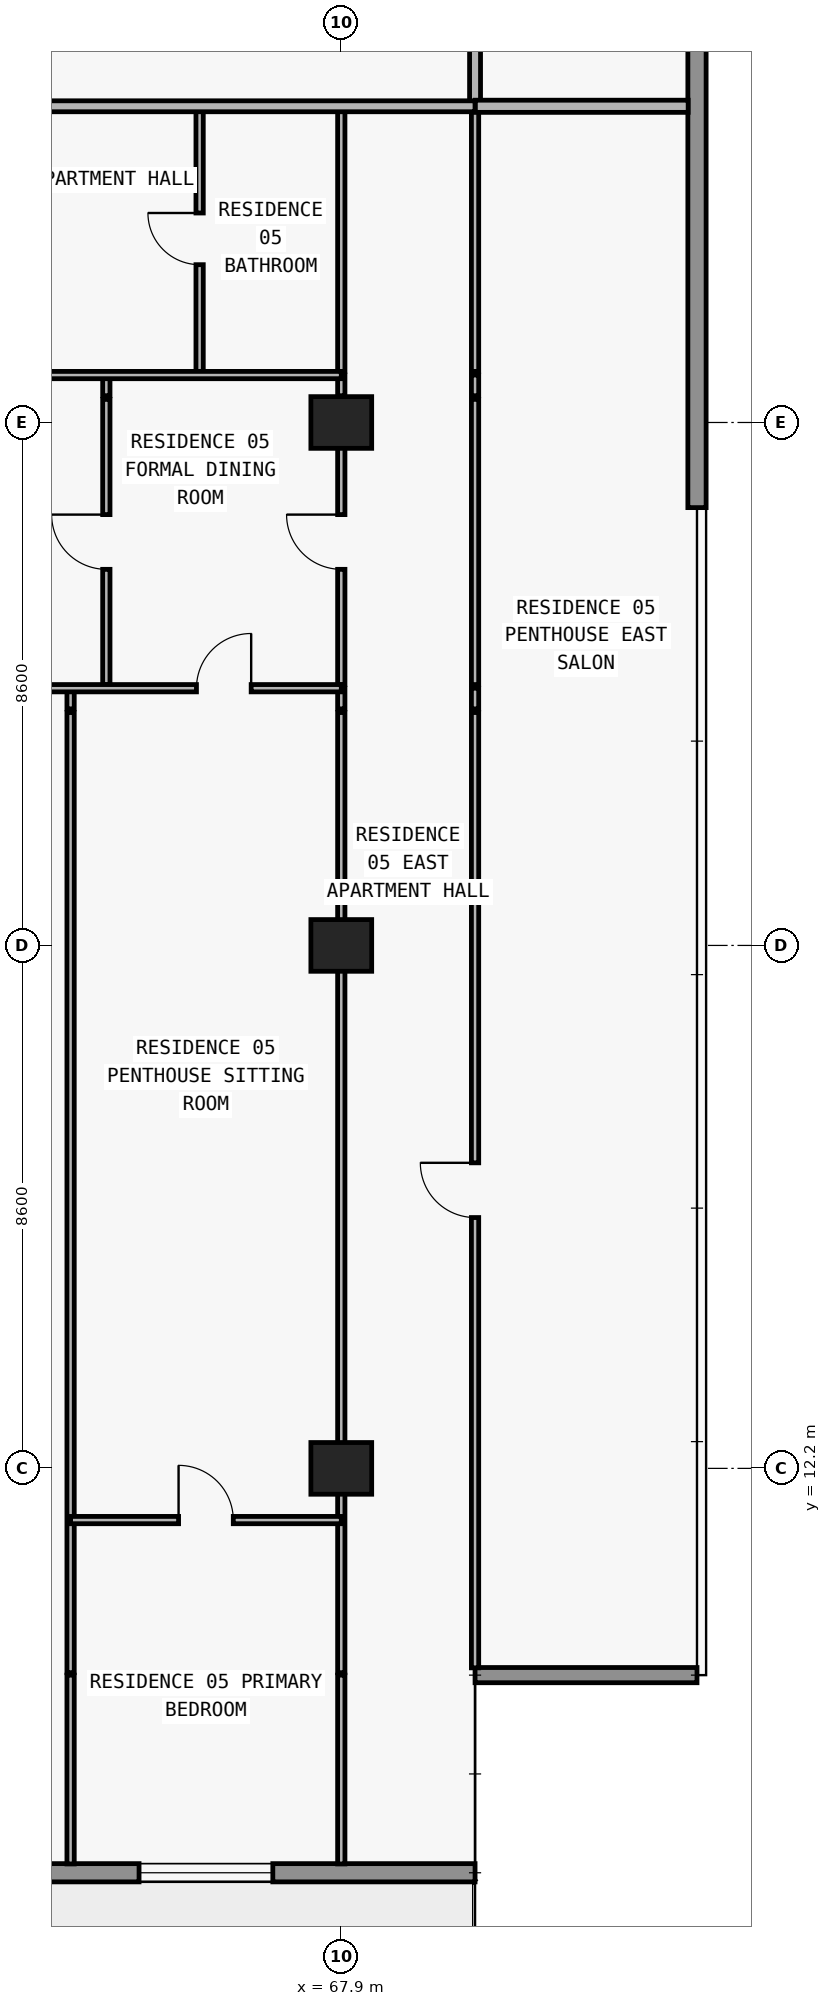
"""IFC4 building model, lengths in metres.
Left out: names, types, materials, properties, quantities, classifications, styles, units other than length and angle.
Written with IfcOpenShell. Run it as: python <this file> out.ifc"""

import sys

from ifc_helpers import new_model, si_unit, direction, frame, frame_2d, origin, origin_2d, place, context, subcontext, project, spatial, rectangle, extrude, element, fill, save


model = new_model("IFC4")
c1 = context("Model", 3, precision=1e-05, world=origin(), true_north=direction((0.0, 1.0)))
c2 = subcontext(c1, "Body", "Model", "MODEL_VIEW")
j1 = project(units=[si_unit("LENGTHUNIT", "METRE"), si_unit("PLANEANGLEUNIT", "RADIAN")], contexts=[c1])
p1 = place(None, origin())
s1 = spatial("IfcSite", under=j1, at=p1, CompositionType="ELEMENT")
p2 = place(p1, origin())
s2 = spatial("IfcBuilding", under=s1, at=p2, CompositionType="ELEMENT")
p3 = place(p2, frame((0.0, 0.0, 109.2)))
s3 = spatial("IfcBuildingStorey", under=s2, at=p3, CompositionType="ELEMENT", Elevation=109.2)
for number, where, z_axis, x_axis in (
    (1, (67.9, 12.2, 0.0), (0.0, 0.0, 1.0), (1.0, 0.0, 0.0)),
    (2, (67.9, 20.8, 0.0), (0.0, 0.0, 1.0), (1.0, 0.0, 0.0)),
    (3, (67.9, 29.4, 0.0), (0.0, 0.0, 1.0), (1.0, 0.0, 0.0)),
):
    element("IfcColumn", number, at=place(p3, frame(where, z_axis=z_axis, x_axis=x_axis)), inside=s3, PredefinedType="COLUMN", context=c2, shape_type="SweptSolid", body=[
        extrude(rectangle(XDim=1.0, YDim=0.85, at=origin_2d()), origin(), (0.0, 0.0, 1.0), 3.05),
    ])
p4 = place(p3, frame((70.1, 5.55, 0.0), z_axis=(0.0, 0.0, 1.0), x_axis=(-1.0, 0.0, 0.0)))
e4 = element("IfcWall", 4, at=p4, inside=s3, PredefinedType="STANDARD", context=c2, shape_type="SweptSolid", body=[
    extrude(rectangle(XDim=62.4, YDim=0.3, at=frame_2d((31.2, 0.0))), origin(), (0.0, 0.0, 1.0), 3.05),
])
p5 = place(p4, frame((57.226, 0.0, 0.0)))
e5 = element("IfcOpeningElement", 5, at=p5, cuts=e4, PredefinedType="OPENING", context=c2, shape_type="SweptSolid", body=[
    extrude(rectangle(XDim=2.0, YDim=2.3, at=frame_2d((1.0, 1.15))), frame((0.0, 0.16, 0.0), z_axis=(0.0, -1.0, 0.0), x_axis=(1.0, 0.0, 0.0)), (0.0, 0.0, 1.0), 0.32),
])
p6 = place(p4, frame((52.926, 0.0, 0.85)))
e6 = element("IfcOpeningElement", 6, at=p6, cuts=e4, PredefinedType="OPENING", context=c2, shape_type="SweptSolid", body=[
    extrude(rectangle(XDim=2.2, YDim=1.55, at=frame_2d((1.1, 0.775))), frame((0.0, 0.16, 0.0), z_axis=(0.0, -1.0, 0.0), x_axis=(1.0, 0.0, 0.0)), (0.0, 0.0, 1.0), 0.32),
])
p7 = place(p4, frame((48.49, 0.0, 0.0)))
e7 = element("IfcOpeningElement", 7, at=p7, cuts=e4, PredefinedType="OPENING", context=c2, shape_type="SweptSolid", body=[
    extrude(rectangle(XDim=2.0, YDim=2.3, at=frame_2d((1.0, 1.15))), frame((0.0, 0.16, 0.0), z_axis=(0.0, -1.0, 0.0), x_axis=(1.0, 0.0, 0.0)), (0.0, 0.0, 1.0), 0.32),
])
p8 = place(p4, frame((44.39, 0.0, 0.85)))
e8 = element("IfcOpeningElement", 8, at=p8, cuts=e4, PredefinedType="OPENING", context=c2, shape_type="SweptSolid", body=[
    extrude(rectangle(XDim=1.8, YDim=1.55, at=frame_2d((0.9, 0.775))), frame((0.0, 0.16, 0.0), z_axis=(0.0, -1.0, 0.0), x_axis=(1.0, 0.0, 0.0)), (0.0, 0.0, 1.0), 0.32),
])
p9 = place(p4, frame((40.49, 0.0, 0.0)))
e9 = element("IfcOpeningElement", 9, at=p9, cuts=e4, PredefinedType="OPENING", context=c2, shape_type="SweptSolid", body=[
    extrude(rectangle(XDim=2.0, YDim=2.3, at=frame_2d((1.0, 1.15))), frame((0.0, 0.16, 0.0), z_axis=(0.0, -1.0, 0.0), x_axis=(1.0, 0.0, 0.0)), (0.0, 0.0, 1.0), 0.32),
])
p10 = place(p4, frame((35.81, 0.0, 0.65)))
e10 = element("IfcOpeningElement", 10, at=p10, cuts=e4, PredefinedType="OPENING", context=c2, shape_type="SweptSolid", body=[
    extrude(rectangle(XDim=2.6, YDim=1.85, at=frame_2d((1.3, 0.925))), frame((0.0, 0.16, 0.0), z_axis=(0.0, -1.0, 0.0), x_axis=(1.0, 0.0, 0.0)), (0.0, 0.0, 1.0), 0.32),
])
p11 = place(p4, frame((30.1, 0.0, 0.85)))
e11 = element("IfcOpeningElement", 11, at=p11, cuts=e4, PredefinedType="OPENING", context=c2, shape_type="SweptSolid", body=[
    extrude(rectangle(XDim=2.2, YDim=1.55, at=frame_2d((1.1, 0.775))), frame((0.0, 0.16, 0.0), z_axis=(0.0, -1.0, 0.0), x_axis=(1.0, 0.0, 0.0)), (0.0, 0.0, 1.0), 0.32),
])
p12 = place(p4, frame((22.1, 0.0, 0.85)))
e12 = element("IfcOpeningElement", 12, at=p12, cuts=e4, PredefinedType="OPENING", context=c2, shape_type="SweptSolid", body=[
    extrude(rectangle(XDim=2.2, YDim=1.55, at=frame_2d((1.1, 0.775))), frame((0.0, 0.16, 0.0), z_axis=(0.0, -1.0, 0.0), x_axis=(1.0, 0.0, 0.0)), (0.0, 0.0, 1.0), 0.32),
])
p13 = place(p4, frame((15.69, 0.0, 0.0)))
e13 = element("IfcOpeningElement", 13, at=p13, cuts=e4, PredefinedType="OPENING", context=c2, shape_type="SweptSolid", body=[
    extrude(rectangle(XDim=2.0, YDim=2.3, at=frame_2d((1.0, 1.15))), frame((0.0, 0.16, 0.0), z_axis=(0.0, -1.0, 0.0), x_axis=(1.0, 0.0, 0.0)), (0.0, 0.0, 1.0), 0.32),
])
p14 = place(p4, frame((11.59, 0.0, 0.85)))
e14 = element("IfcOpeningElement", 14, at=p14, cuts=e4, PredefinedType="OPENING", context=c2, shape_type="SweptSolid", body=[
    extrude(rectangle(XDim=1.8, YDim=1.55, at=frame_2d((0.9, 0.775))), frame((0.0, 0.16, 0.0), z_axis=(0.0, -1.0, 0.0), x_axis=(1.0, 0.0, 0.0)), (0.0, 0.0, 1.0), 0.32),
])
p15 = place(p4, frame((7.626, 0.0, 0.0)))
e15 = element("IfcOpeningElement", 15, at=p15, cuts=e4, PredefinedType="OPENING", context=c2, shape_type="SweptSolid", body=[
    extrude(rectangle(XDim=2.0, YDim=2.3, at=frame_2d((1.0, 1.15))), frame((0.0, 0.16, 0.0), z_axis=(0.0, -1.0, 0.0), x_axis=(1.0, 0.0, 0.0)), (0.0, 0.0, 1.0), 0.32),
])
p16 = place(p4, frame((3.326, 0.0, 0.85)))
e16 = element("IfcOpeningElement", 16, at=p16, cuts=e4, PredefinedType="OPENING", context=c2, shape_type="SweptSolid", body=[
    extrude(rectangle(XDim=2.2, YDim=1.55, at=frame_2d((1.1, 0.775))), frame((0.0, 0.16, 0.0), z_axis=(0.0, -1.0, 0.0), x_axis=(1.0, 0.0, 0.0)), (0.0, 0.0, 1.0), 0.32),
])
p17 = place(p3, frame((70.1, 8.8, 0.0), z_axis=(0.0, 0.0, 1.0), x_axis=(1.0, 0.0, 0.0)))
e17 = element("IfcWall", 17, at=p17, inside=s3, PredefinedType="ELEMENTEDWALL", context=c2, shape_type="SweptSolid", body=[
    extrude(rectangle(XDim=3.65, YDim=0.25, at=frame_2d((1.825, 0.0))), origin(), (0.0, 0.0, 1.0), 3.05),
])
p18 = place(p3, frame((73.75, 47.2, 0.0), z_axis=(0.0, 0.0, 1.0), x_axis=(0.0, -1.0, 0.0)))
e18 = element("IfcWall", 18, at=p18, inside=s3, PredefinedType="STANDARD", context=c2, shape_type="SweptSolid", body=[
    extrude(rectangle(XDim=19.2, YDim=0.3, at=frame_2d((9.6, 0.0))), origin(), (0.0, 0.0, 1.0), 3.05),
])
p19 = place(p3, frame((63.448, 5.695, 0.0), z_axis=(0.0, 0.0, 1.0), x_axis=(0.0, 1.0, 0.0)))
e19 = element("IfcWall", 19, at=p19, inside=s3, PredefinedType="PARTITIONING", context=c2, shape_type="SweptSolid", body=[
    extrude(rectangle(XDim=3.105, YDim=0.12, at=frame_2d((1.552, 0.0))), origin(), (0.0, 0.0, 1.0), 3.05),
])
p20 = place(p3, frame((63.448, 8.84, 0.0), z_axis=(0.0, 0.0, 1.0), x_axis=(0.0, 1.0, 0.0)))
e20 = element("IfcWall", 20, at=p20, inside=s3, PredefinedType="PARTITIONING", context=c2, shape_type="SweptSolid", body=[
    extrude(rectangle(XDim=15.79, YDim=0.12, at=frame_2d((7.895, 0.0))), origin(), (0.0, 0.0, 1.0), 3.05),
])
p21 = place(p3, frame((63.448, 24.69, 0.0), z_axis=(0.0, 0.0, 1.0), x_axis=(0.0, 1.0, 0.0)))
e21 = element("IfcWall", 21, at=p21, inside=s3, PredefinedType="PARTITIONING", context=c2, shape_type="SweptSolid", body=[
    extrude(rectangle(XDim=0.34, YDim=0.12, at=frame_2d((0.17, 0.0))), origin(), (0.0, 0.0, 1.0), 3.05),
])
p22 = place(p3, frame((64.036, 25.09, 0.0), z_axis=(0.0, 0.0, 1.0), x_axis=(0.0, 1.0, 0.0)))
e22 = element("IfcWall", 22, at=p22, inside=s3, PredefinedType="PARTITIONING", context=c2, shape_type="SweptSolid", body=[
    extrude(rectangle(XDim=4.69, YDim=0.12, at=frame_2d((2.345, 0.0))), origin(), (0.0, 0.0, 1.0), 3.05),
])
p23 = place(p22, frame((1.895, 0.0, 0.0)))
e23 = element("IfcOpeningElement", 23, at=p23, cuts=e22, PredefinedType="OPENING", context=c2, shape_type="SweptSolid", body=[
    extrude(rectangle(XDim=0.9, YDim=2.15, at=frame_2d((0.45, 1.075))), frame((0.0, 0.07, 0.0), z_axis=(0.0, -1.0, 0.0), x_axis=(1.0, 0.0, 0.0)), (0.0, 0.0, 1.0), 0.14),
])
p24 = place(p3, frame((64.036, 29.84, 0.0), z_axis=(0.0, 0.0, 1.0), x_axis=(0.0, 1.0, 0.0)))
e24 = element("IfcWall", 24, at=p24, inside=s3, PredefinedType="PARTITIONING", context=c2, shape_type="SweptSolid", body=[
    extrude(rectangle(XDim=0.34, YDim=0.12, at=frame_2d((0.17, 0.0))), origin(), (0.0, 0.0, 1.0), 3.05),
])
p25 = place(p3, frame((65.57, 30.24, 0.0), z_axis=(0.0, 0.0, 1.0), x_axis=(0.0, 1.0, 0.0)))
e25 = element("IfcWall", 25, at=p25, inside=s3, PredefinedType="PARTITIONING", context=c2, shape_type="SweptSolid", body=[
    extrude(rectangle(XDim=4.36, YDim=0.12, at=frame_2d((2.18, 0.0))), origin(), (0.0, 0.0, 1.0), 3.05),
])
p26 = place(p25, frame((1.755, 0.0, 0.0)))
e26 = element("IfcOpeningElement", 26, at=p26, cuts=e25, PredefinedType="OPENING", context=c2, shape_type="SweptSolid", body=[
    extrude(rectangle(XDim=0.85, YDim=2.1, at=frame_2d((0.425, 1.05))), frame((0.0, 0.07, 0.0), z_axis=(0.0, -1.0, 0.0), x_axis=(1.0, 0.0, 0.0)), (0.0, 0.0, 1.0), 0.14),
])
p27 = place(p3, frame((67.9, 5.695, 0.0), z_axis=(0.0, 0.0, 1.0), x_axis=(0.0, 1.0, 0.0)))
e27 = element("IfcWall", 27, at=p27, inside=s3, PredefinedType="PARTITIONING", context=c2, shape_type="SweptSolid", body=[
    extrude(rectangle(XDim=3.105, YDim=0.12, at=frame_2d((1.552, 0.0))), origin(), (0.0, 0.0, 1.0), 3.05),
])
p28 = place(p3, frame((67.9, 8.84, 0.0), z_axis=(0.0, 0.0, 1.0), x_axis=(0.0, 1.0, 0.0)))
e28 = element("IfcWall", 28, at=p28, inside=s3, PredefinedType="PARTITIONING", context=c2, shape_type="SweptSolid", body=[
    extrude(rectangle(XDim=15.79, YDim=0.12, at=frame_2d((7.895, 0.0))), origin(), (0.0, 0.0, 1.0), 2.174),
])
p29 = place(p3, frame((67.9, 24.69, 0.0), z_axis=(0.0, 0.0, 1.0), x_axis=(0.0, 1.0, 0.0)))
e29 = element("IfcWall", 29, at=p29, inside=s3, PredefinedType="PARTITIONING", context=c2, shape_type="SweptSolid", body=[
    extrude(rectangle(XDim=0.34, YDim=0.12, at=frame_2d((0.17, 0.0))), origin(), (0.0, 0.0, 1.0), 2.174),
])
p30 = place(p3, frame((67.9, 25.09, 0.0), z_axis=(0.0, 0.0, 1.0), x_axis=(0.0, 1.0, 0.0)))
e30 = element("IfcWall", 30, at=p30, inside=s3, PredefinedType="PARTITIONING", context=c2, shape_type="SweptSolid", body=[
    extrude(rectangle(XDim=4.69, YDim=0.12, at=frame_2d((2.345, 0.0))), origin(), (0.0, 0.0, 1.0), 2.174),
])
p31 = place(p30, frame((1.895, 0.0, 0.0)))
e31 = element("IfcOpeningElement", 31, at=p31, cuts=e30, PredefinedType="OPENING", context=c2, shape_type="SweptSolid", body=[
    extrude(rectangle(XDim=0.9, YDim=2.124, at=frame_2d((0.45, 1.062))), frame((0.0, 0.07, 0.0), z_axis=(0.0, -1.0, 0.0), x_axis=(1.0, 0.0, 0.0)), (0.0, 0.0, 1.0), 0.14),
])
p32 = place(p3, frame((67.9, 29.84, 0.0), z_axis=(0.0, 0.0, 1.0), x_axis=(0.0, 1.0, 0.0)))
e32 = element("IfcWall", 32, at=p32, inside=s3, PredefinedType="PARTITIONING", context=c2, shape_type="SweptSolid", body=[
    extrude(rectangle(XDim=0.34, YDim=0.12, at=frame_2d((0.17, 0.0))), origin(), (0.0, 0.0, 1.0), 2.174),
])
p33 = place(p3, frame((67.9, 30.24, 0.0), z_axis=(0.0, 0.0, 1.0), x_axis=(0.0, 1.0, 0.0)))
e33 = element("IfcWall", 33, at=p33, inside=s3, PredefinedType="PARTITIONING", context=c2, shape_type="SweptSolid", body=[
    extrude(rectangle(XDim=4.36, YDim=0.12, at=frame_2d((2.18, 0.0))), origin(), (0.0, 0.0, 1.0), 2.174),
])
p34 = place(p3, frame((70.1, 8.92, 0.0), z_axis=(0.0, 0.0, 1.0), x_axis=(0.0, 1.0, 0.0)))
e34 = element("IfcWall", 34, at=p34, inside=s3, PredefinedType="PARTITIONING", context=c2, shape_type="SweptSolid", body=[
    extrude(rectangle(XDim=15.71, YDim=0.12, at=frame_2d((7.855, 0.0))), origin(), (0.0, 0.0, 1.0), 3.05),
])
p35 = place(p34, frame((7.405, 0.0, 0.0)))
e35 = element("IfcOpeningElement", 35, at=p35, cuts=e34, PredefinedType="OPENING", context=c2, shape_type="SweptSolid", body=[
    extrude(rectangle(XDim=0.9, YDim=2.15, at=frame_2d((0.45, 1.075))), frame((0.0, 0.07, 0.0), z_axis=(0.0, -1.0, 0.0), x_axis=(1.0, 0.0, 0.0)), (0.0, 0.0, 1.0), 0.14),
])
p36 = place(p3, frame((70.1, 24.69, 0.0), z_axis=(0.0, 0.0, 1.0), x_axis=(0.0, 1.0, 0.0)))
e36 = element("IfcWall", 36, at=p36, inside=s3, PredefinedType="PARTITIONING", context=c2, shape_type="SweptSolid", body=[
    extrude(rectangle(XDim=0.34, YDim=0.12, at=frame_2d((0.17, 0.0))), origin(), (0.0, 0.0, 1.0), 3.05),
])
p37 = place(p3, frame((70.1, 25.09, 0.0), z_axis=(0.0, 0.0, 1.0), x_axis=(0.0, 1.0, 0.0)))
e37 = element("IfcWall", 37, at=p37, inside=s3, PredefinedType="PARTITIONING", context=c2, shape_type="SweptSolid", body=[
    extrude(rectangle(XDim=4.69, YDim=0.12, at=frame_2d((2.345, 0.0))), origin(), (0.0, 0.0, 1.0), 3.05),
])
p38 = place(p3, frame((70.1, 29.84, 0.0), z_axis=(0.0, 0.0, 1.0), x_axis=(0.0, 1.0, 0.0)))
e38 = element("IfcWall", 38, at=p38, inside=s3, PredefinedType="PARTITIONING", context=c2, shape_type="SweptSolid", body=[
    extrude(rectangle(XDim=0.34, YDim=0.12, at=frame_2d((0.17, 0.0))), origin(), (0.0, 0.0, 1.0), 3.05),
])
p39 = place(p3, frame((70.1, 30.24, 0.0), z_axis=(0.0, 0.0, 1.0), x_axis=(0.0, 1.0, 0.0)))
e39 = element("IfcWall", 39, at=p39, inside=s3, PredefinedType="PARTITIONING", context=c2, shape_type="SweptSolid", body=[
    extrude(rectangle(XDim=4.36, YDim=0.12, at=frame_2d((2.18, 0.0))), origin(), (0.0, 0.0, 1.0), 3.05),
])
p40 = place(p3, frame((70.1, 34.605, 0.0), z_axis=(0.0, 0.0, 1.0), x_axis=(0.0, 1.0, 0.0)))
e40 = element("IfcWall", 40, at=p40, inside=s3, PredefinedType="PARTITIONING", context=c2, shape_type="SweptSolid", body=[
    extrude(rectangle(XDim=2.345, YDim=0.18, at=frame_2d((1.172, 0.0))), origin(), (0.0, 0.0, 1.0), 3.05),
])
p41 = place(p3, frame((63.448, 11.35, 0.0), z_axis=(0.0, 0.0, 1.0), x_axis=(1.0, 0.0, 0.0)))
e41 = element("IfcWall", 41, at=p41, inside=s3, PredefinedType="PARTITIONING", context=c2, shape_type="SweptSolid", body=[
    extrude(rectangle(XDim=4.452, YDim=0.12, at=frame_2d((2.226, 0.0))), origin(), (0.0, 0.0, 1.0), 3.05),
])
p42 = place(p41, frame((1.776, 0.0, 0.0)))
e42 = element("IfcOpeningElement", 42, at=p42, cuts=e41, PredefinedType="OPENING", context=c2, shape_type="SweptSolid", body=[
    extrude(rectangle(XDim=0.9, YDim=2.15, at=frame_2d((0.45, 1.075))), frame((0.0, 0.07, 0.0), z_axis=(0.0, -1.0, 0.0), x_axis=(1.0, 0.0, 0.0)), (0.0, 0.0, 1.0), 0.14),
])
p43 = place(p3, frame((59.55, 25.03, 0.0), z_axis=(0.0, 0.0, 1.0), x_axis=(1.0, 0.0, 0.0)))
e43 = element("IfcWall", 43, at=p43, inside=s3, PredefinedType="PARTITIONING", context=c2, shape_type="SweptSolid", body=[
    extrude(rectangle(XDim=8.35, YDim=0.12, at=frame_2d((4.175, 0.0))), origin(), (0.0, 0.0, 1.0), 3.05),
])
p44 = place(p43, frame((1.499, 0.0, 0.0)))
e44 = element("IfcOpeningElement", 44, at=p44, cuts=e43, PredefinedType="OPENING", context=c2, shape_type="SweptSolid", body=[
    extrude(rectangle(XDim=0.9, YDim=2.15, at=frame_2d((0.45, 1.075))), frame((0.0, 0.07, 0.0), z_axis=(0.0, -1.0, 0.0), x_axis=(1.0, 0.0, 0.0)), (0.0, 0.0, 1.0), 0.14),
])
p45 = place(p43, frame((5.968, 0.0, 0.0)))
e45 = element("IfcOpeningElement", 45, at=p45, cuts=e43, PredefinedType="OPENING", context=c2, shape_type="SweptSolid", body=[
    extrude(rectangle(XDim=0.9, YDim=2.15, at=frame_2d((0.45, 1.075))), frame((0.0, 0.07, 0.0), z_axis=(0.0, -1.0, 0.0), x_axis=(1.0, 0.0, 0.0)), (0.0, 0.0, 1.0), 0.14),
])
p46 = place(p3, frame((59.55, 30.18, 0.0), z_axis=(0.0, 0.0, 1.0), x_axis=(1.0, 0.0, 0.0)))
e46 = element("IfcWall", 46, at=p46, inside=s3, PredefinedType="PARTITIONING", context=c2, shape_type="SweptSolid", body=[
    extrude(rectangle(XDim=8.35, YDim=0.12, at=frame_2d((4.175, 0.0))), origin(), (0.0, 0.0, 1.0), 3.05),
])
p47 = place(p46, frame((1.793, 0.0, 0.0)))
e47 = element("IfcOpeningElement", 47, at=p47, cuts=e46, PredefinedType="OPENING", context=c2, shape_type="SweptSolid", body=[
    extrude(rectangle(XDim=0.9, YDim=2.15, at=frame_2d((0.45, 1.075))), frame((0.0, 0.07, 0.0), z_axis=(0.0, -1.0, 0.0), x_axis=(1.0, 0.0, 0.0)), (0.0, 0.0, 1.0), 0.14),
])
p48 = place(p3, frame((59.55, 34.6, 0.0), z_axis=(0.0, 0.0, 1.0), x_axis=(1.0, 0.0, 0.0)))
e48 = element("IfcWall", 48, at=p48, inside=s3, PredefinedType="PARTITIONING", context=c2, shape_type="SweptSolid", body=[
    extrude(rectangle(XDim=10.55, YDim=0.18, at=frame_2d((5.275, 0.0))), origin(), (0.0, 0.0, 1.0), 3.05),
])
p49 = place(p48, frame((2.51, 0.0, 0.0)))
e49 = element("IfcOpeningElement", 49, at=p49, cuts=e48, PredefinedType="OPENING", context=c2, shape_type="SweptSolid", body=[
    extrude(rectangle(XDim=1.0, YDim=2.2, at=frame_2d((0.5, 1.1))), frame((0.0, 0.1, 0.0), z_axis=(0.0, -1.0, 0.0), x_axis=(1.0, 0.0, 0.0)), (0.0, 0.0, 1.0), 0.2),
])
p50 = place(p3, frame((70.105, 34.6, 0.0), z_axis=(0.0, 0.0, 1.0), x_axis=(1.0, 0.0, 0.0)))
e50 = element("IfcWall", 50, at=p50, inside=s3, PredefinedType="PARTITIONING", context=c2, shape_type="SweptSolid", body=[
    extrude(rectangle(XDim=3.5, YDim=0.2, at=frame_2d((1.75, 0.0))), origin(), (0.0, 0.0, 1.0), 3.05),
])
p51 = place(p16, origin())
e51 = element("IfcWindow", 51, at=p51, inside=s3, PartitioningType="SINGLE_PANEL", PredefinedType="WINDOW", context=c2, shape_type="SweptSolid", body=[
    extrude(rectangle(XDim=2.2, YDim=1.55, at=frame_2d((1.1, 0.775))), frame((0.0, 0.03, 0.0), z_axis=(0.0, -1.0, 0.0), x_axis=(1.0, 0.0, 0.0)), (0.0, 0.0, 1.0), 0.06),
])
fill(e16, e51)
p52 = place(p26, origin())
e52 = element("IfcDoor", 52, at=p52, inside=s3, OperationType="SINGLE_SWING_RIGHT", PredefinedType="DOOR", context=c2, shape_type="SweptSolid", body=[
    extrude(rectangle(XDim=0.85, YDim=2.1, at=frame_2d((0.425, 1.05))), frame((0.0, 0.025, 0.0), z_axis=(0.0, -1.0, 0.0), x_axis=(1.0, 0.0, 0.0)), (0.0, 0.0, 1.0), 0.05),
])
fill(e26, e52)
p53 = place(p23, origin())
e53 = element("IfcDoor", 53, at=p53, inside=s3, OperationType="SINGLE_SWING_RIGHT", PredefinedType="DOOR", context=c2, shape_type="SweptSolid", body=[
    extrude(rectangle(XDim=0.9, YDim=2.15, at=frame_2d((0.45, 1.075))), frame((0.0, 0.025, 0.0), z_axis=(0.0, -1.0, 0.0), x_axis=(1.0, 0.0, 0.0)), (0.0, 0.0, 1.0), 0.05),
])
fill(e23, e53)
p54 = place(p45, origin())
e54 = element("IfcDoor", 54, at=p54, inside=s3, OperationType="SINGLE_SWING_RIGHT", PredefinedType="DOOR", context=c2, shape_type="SweptSolid", body=[
    extrude(rectangle(XDim=0.9, YDim=2.15, at=frame_2d((0.45, 1.075))), frame((0.0, 0.025, 0.0), z_axis=(0.0, -1.0, 0.0), x_axis=(1.0, 0.0, 0.0)), (0.0, 0.0, 1.0), 0.05),
])
fill(e45, e54)
p55 = place(p42, origin())
e55 = element("IfcDoor", 55, at=p55, inside=s3, OperationType="SINGLE_SWING_LEFT", PredefinedType="DOOR", context=c2, shape_type="SweptSolid", body=[
    extrude(rectangle(XDim=0.9, YDim=2.15, at=frame_2d((0.45, 1.075))), frame((0.0, 0.025, 0.0), z_axis=(0.0, -1.0, 0.0), x_axis=(1.0, 0.0, 0.0)), (0.0, 0.0, 1.0), 0.05),
])
fill(e42, e55)
p56 = place(p31, origin())
e56 = element("IfcDoor", 56, at=p56, inside=s3, OperationType="SINGLE_SWING_RIGHT", PredefinedType="DOOR", context=c2, shape_type="SweptSolid", body=[
    extrude(rectangle(XDim=0.9, YDim=2.124, at=frame_2d((0.45, 1.062))), frame((0.0, 0.025, 0.0), z_axis=(0.0, -1.0, 0.0), x_axis=(1.0, 0.0, 0.0)), (0.0, 0.0, 1.0), 0.05),
])
fill(e31, e56)
p57 = place(p35, origin())
e57 = element("IfcDoor", 57, at=p57, inside=s3, OperationType="SINGLE_SWING_RIGHT", PredefinedType="DOOR", context=c2, shape_type="SweptSolid", body=[
    extrude(rectangle(XDim=0.9, YDim=2.15, at=frame_2d((0.45, 1.075))), frame((0.0, 0.025, 0.0), z_axis=(0.0, -1.0, 0.0), x_axis=(1.0, 0.0, 0.0)), (0.0, 0.0, 1.0), 0.05),
])
fill(e35, e57)
save(model, sys.argv[1])
